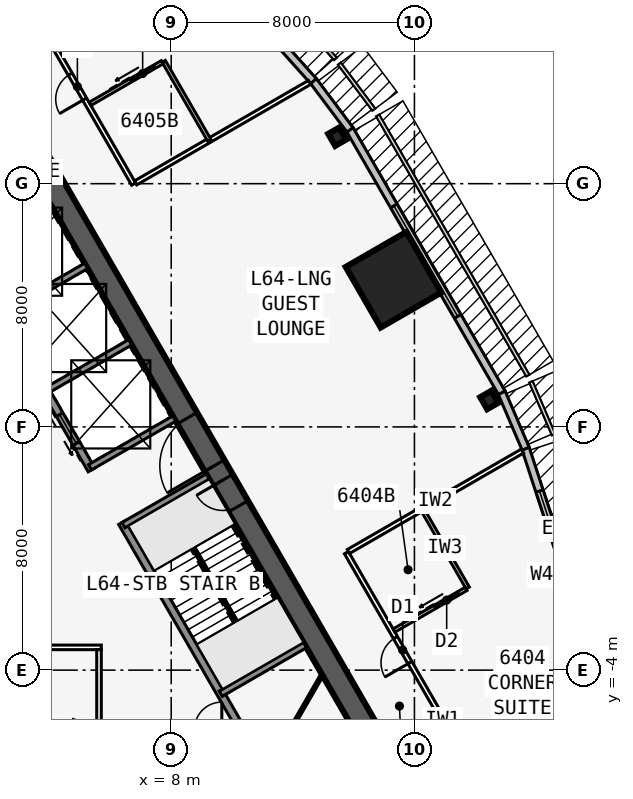
"""IFC4 building model, lengths in metres.
Left out: names, types, materials, properties, quantities, classifications, styles, units other than length and angle.
Written with IfcOpenShell. Run it as: python <this file> out.ifc"""

import sys

from ifc_helpers import new_model, si_unit, direction, frame, frame_2d, origin, origin_2d, place, context, subcontext, project, spatial, rectangle, i_section, extrude, element, fill, save


model = new_model("IFC4")
c1 = context("Model", 3, precision=1e-05, world=origin(), true_north=direction((0.0, 1.0)))
c2 = subcontext(c1, "Body", "Model", "MODEL_VIEW")
j1 = project(units=[si_unit("LENGTHUNIT", "METRE"), si_unit("PLANEANGLEUNIT", "RADIAN")], contexts=[c1])
p1 = place(None, origin())
s1 = spatial("IfcSite", under=j1, at=p1, CompositionType="ELEMENT")
p2 = place(p1, origin())
s2 = spatial("IfcBuilding", under=s1, at=p2, CompositionType="ELEMENT")
p3 = place(p2, frame((0.0, 0.0, 242.9)))
s3 = spatial("IfcBuildingStorey", under=s2, at=p3, CompositionType="ELEMENT", Elevation=242.9)
p4 = place(p3, frame((16.5, -9.526, 0.0), z_axis=(0.0, 0.0, 1.0), x_axis=(-0.499999749417, 0.866025548458, 0.0)))
e1 = element("IfcWall", 1, at=p4, inside=s3, PredefinedType="SHEAR", context=c2, shape_type="SweptSolid", body=[
    extrude(rectangle(XDim=33.0, YDim=0.75, at=frame_2d((16.5, 0.0))), origin(), (0.0, 0.0, 1.0), 3.6),
])
p5 = place(p4, frame((14.15, 0.0, 0.0)))
e2 = element("IfcOpeningElement", 2, at=p5, cuts=e1, PredefinedType="OPENING", context=c2, shape_type="SweptSolid", body=[
    extrude(rectangle(XDim=1.8, YDim=2.13, at=frame_2d((0.9, 1.065))), frame((0.0, 0.385, 0.0), z_axis=(0.0, -1.0, 0.0), x_axis=(1.0, 0.0, 0.0)), (0.0, 0.0, 1.0), 0.77),
])
p6 = place(p4, frame((12.6, 0.0, 0.0)))
e3 = element("IfcOpeningElement", 3, at=p6, cuts=e1, PredefinedType="OPENING", context=c2, shape_type="SweptSolid", body=[
    extrude(rectangle(XDim=1.0, YDim=2.13, at=frame_2d((0.5, 1.065))), frame((0.0, 0.385, 0.0), z_axis=(0.0, -1.0, 0.0), x_axis=(1.0, 0.0, 0.0)), (0.0, 0.0, 1.0), 0.77),
])
p7 = place(p3, frame((10.245, -5.843, 0.0), z_axis=(0.0, 0.0, 1.0), x_axis=(-0.499993009313, 0.866029439822, 0.0)))
e4 = element("IfcWall", 4, at=p7, inside=s3, PredefinedType="SOLIDWALL", context=c2, shape_type="SweptSolid", body=[
    extrude(rectangle(XDim=7.733, YDim=0.25, at=frame_2d((3.866, 0.0))), origin(), (0.0, 0.0, 1.0), 3.435),
])
p8 = place(p3, frame((5.379, 2.586, 0.0), z_axis=(0.0, 0.0, 1.0), x_axis=(-0.500001375892, 0.866024609411, 0.0)))
e5 = element("IfcWall", 5, at=p8, inside=s3, PredefinedType="SOLIDWALL", context=c2, shape_type="SweptSolid", body=[
    extrude(rectangle(XDim=10.633, YDim=0.25, at=frame_2d((5.316, 0.0))), origin(), (0.0, 0.0, 1.0), 3.435),
])
p9 = place(p8, frame((9.164, 0.0, 0.0)))
e6 = element("IfcOpeningElement", 6, at=p9, cuts=e5, PredefinedType="OPENING", context=c2, shape_type="SweptSolid", body=[
    extrude(rectangle(XDim=0.9, YDim=2.13, at=frame_2d((0.45, 1.065))), frame((0.0, 0.135, 0.0), z_axis=(0.0, -1.0, 0.0), x_axis=(1.0, 0.0, 0.0)), (0.0, 0.0, 1.0), 0.27),
])
p10 = place(p8, frame((1.0, 0.0, 0.0)))
e7 = element("IfcOpeningElement", 7, at=p10, cuts=e5, PredefinedType="OPENING", context=c2, shape_type="SweptSolid", body=[
    extrude(rectangle(XDim=1.1, YDim=2.13, at=frame_2d((0.55, 1.065))), frame((0.0, 0.135, 0.0), z_axis=(0.0, -1.0, 0.0), x_axis=(1.0, 0.0, 0.0)), (0.0, 0.0, 1.0), 0.27),
])
p11 = place(p8, frame((3.9, 0.0, 0.0)))
e8 = element("IfcOpeningElement", 8, at=p11, cuts=e5, PredefinedType="OPENING", context=c2, shape_type="SweptSolid", body=[
    extrude(rectangle(XDim=1.1, YDim=2.13, at=frame_2d((0.55, 1.065))), frame((0.0, 0.135, 0.0), z_axis=(0.0, -1.0, 0.0), x_axis=(1.0, 0.0, 0.0)), (0.0, 0.0, 1.0), 0.27),
])
p12 = place(p8, frame((6.8, 0.0, 0.0)))
e9 = element("IfcOpeningElement", 9, at=p12, cuts=e5, PredefinedType="OPENING", context=c2, shape_type="SweptSolid", body=[
    extrude(rectangle(XDim=1.1, YDim=2.13, at=frame_2d((0.55, 1.065))), frame((0.0, 0.135, 0.0), z_axis=(0.0, -1.0, 0.0), x_axis=(1.0, 0.0, 0.0)), (0.0, 0.0, 1.0), 0.27),
])
for number, where, z_axis, x_axis in (
    (10, (9.629, -4.775, 0.0), (0.0, 0.0, 1.0), (0.866, 0.5, 0.0)),
    (11, (6.429, 0.767, 0.0), (0.0, 0.0, 1.0), (0.866, 0.5, 0.0)),
):
    element("IfcWall", number, at=place(p3, frame(where, z_axis=z_axis, x_axis=x_axis)), inside=s3, PredefinedType="SOLIDWALL", context=c2, shape_type="SweptSolid", body=[
        extrude(rectangle(XDim=3.2, YDim=0.2, at=frame_2d((1.6, 0.0))), origin(), (0.0, 0.0, 1.0), 3.435),
    ])
p13 = place(p3, frame((5.329, 2.673, 0.0), z_axis=(0.0, 0.0, 1.0), x_axis=(0.866022944154, 0.50000426018, 0.0)))
e12 = element("IfcWall", 12, at=p13, inside=s3, PredefinedType="SOLIDWALL", context=c2, shape_type="SweptSolid", body=[
    extrude(rectangle(XDim=3.2, YDim=0.2, at=frame_2d((1.6, 0.0))), origin(), (0.0, 0.0, 1.0), 3.435),
])
for number, where, z_axis, x_axis in (
    (13, (3.879, 5.184, 0.0), (0.0, 0.0, 1.0), (0.866, 0.5, 0.0)),
    (14, (2.429, 7.696, 0.0), (0.0, 0.0, 1.0), (0.866, 0.5, 0.0)),
):
    element("IfcWall", number, at=place(p3, frame(where, z_axis=z_axis, x_axis=x_axis)), inside=s3, PredefinedType="SOLIDWALL", context=c2, shape_type="SweptSolid", body=[
        extrude(rectangle(XDim=3.2, YDim=0.2, at=frame_2d((1.6, 0.0))), origin(), (0.0, 0.0, 1.0), 3.435),
    ])
for number, where, z_axis, x_axis in (
    (15, (18.461, 4.885, 0.0), (0.0, 0.0, 1.0), (0.866, 0.5, 0.0)),
    (16, (13.461, 13.545, 0.0), (0.0, 0.0, 1.0), (0.866, 0.5, 0.0)),
):
    element("IfcColumn", number, at=place(p3, frame(where, z_axis=z_axis, x_axis=x_axis)), inside=s3, PredefinedType="COLUMN", context=c2, shape_type="SweptSolid", body=[
        extrude(i_section(OverallWidth=0.419, OverallDepth=0.455, WebThickness=0.042, FlangeThickness=0.068, at=origin_2d()), origin(), (0.0, 0.0, 1.0), 3.6),
    ])
p14 = place(p3, frame((15.312, 8.84, 0.0), z_axis=(0.0, 0.0, 1.0), x_axis=(0.866025403784, 0.5, 0.0)))
e17 = element("IfcColumn", 17, at=p14, inside=s3, PredefinedType="COLUMN", context=c2, shape_type="SweptSolid", body=[
    extrude(rectangle(XDim=2.3, YDim=2.3, at=origin_2d()), origin(), (0.0, 0.0, 1.0), 3.6),
])
p15 = place(p3, frame((21.881, -3.503, 0.0), z_axis=(0.0, 0.0, 1.0), x_axis=(-0.311328857048, 0.95030223759, 0.0)))
e18 = element("IfcWall", 18, at=p15, inside=s3, PredefinedType="STANDARD", context=c2, shape_type="SweptSolid", body=[
    extrude(rectangle(XDim=7.153, YDim=0.25, at=frame_2d((3.576, 0.0))), origin(), (0.0, 0.0, 1.0), 3.435),
])
p16 = place(p15, frame((1.476, 0.0, 0.45)))
e19 = element("IfcOpeningElement", 19, at=p16, cuts=e18, PredefinedType="OPENING", context=c2, shape_type="SweptSolid", body=[
    extrude(rectangle(XDim=4.2, YDim=2.6, at=frame_2d((2.1, 1.3))), frame((0.0, 0.135, 0.0), z_axis=(0.0, -1.0, 0.0), x_axis=(1.0, 0.0, 0.0)), (0.0, 0.0, 1.0), 0.27),
])
p17 = place(p3, frame((19.658, 3.284, 0.0), z_axis=(0.0, 0.0, 1.0), x_axis=(-0.393290226175, 0.91941437774, 0.0)))
e20 = element("IfcWall", 20, at=p17, inside=s3, PredefinedType="STANDARD", context=c2, shape_type="SweptSolid", body=[
    extrude(rectangle(XDim=2.014, YDim=0.25, at=frame_2d((1.007, 0.0))), origin(), (0.0, 0.0, 1.0), 3.435),
])
p18 = place(p3, frame((18.873, 5.123, 0.0), z_axis=(0.0, 0.0, 1.0), x_axis=(-0.499993662806, 0.866029062534, 0.0)))
e21 = element("IfcWall", 21, at=p18, inside=s3, PredefinedType="STANDARD", context=c2, shape_type="SweptSolid", body=[
    extrude(rectangle(XDim=10.0, YDim=0.25, at=frame_2d((5.0, 0.0))), origin(), (0.0, 0.0, 1.0), 3.435),
])
p19 = place(p18, frame((2.9, 0.0, 0.45)))
e22 = element("IfcOpeningElement", 22, at=p19, cuts=e21, PredefinedType="OPENING", context=c2, shape_type="SweptSolid", body=[
    extrude(rectangle(XDim=4.2, YDim=2.6, at=frame_2d((2.1, 1.3))), frame((0.0, 0.135, 0.0), z_axis=(0.0, -1.0, 0.0), x_axis=(1.0, 0.0, 0.0)), (0.0, 0.0, 1.0), 0.27),
])
p20 = place(p3, frame((13.881, 13.771, 0.0), z_axis=(0.0, 0.0, 1.0), x_axis=(-0.599650843534, 0.800261748335, 0.0)))
e23 = element("IfcWall", 23, at=p20, inside=s3, PredefinedType="STANDARD", context=c2, shape_type="SweptSolid", body=[
    extrude(rectangle(XDim=2.014, YDim=0.25, at=frame_2d((1.007, 0.0))), origin(), (0.0, 0.0, 1.0), 3.435),
])
p21 = place(p3, frame((12.68, 15.374, 0.0), z_axis=(0.0, 0.0, 1.0), x_axis=(-0.667303550892, 0.744785855778, 0.0)))
e24 = element("IfcWall", 24, at=p21, inside=s3, PredefinedType="STANDARD", context=c2, shape_type="SweptSolid", body=[
    extrude(rectangle(XDim=7.153, YDim=0.25, at=frame_2d((3.576, 0.0))), origin(), (0.0, 0.0, 1.0), 3.435),
])
p22 = place(p21, frame((1.476, 0.0, 0.45)))
e25 = element("IfcOpeningElement", 25, at=p22, cuts=e24, PredefinedType="OPENING", context=c2, shape_type="SweptSolid", body=[
    extrude(rectangle(XDim=4.2, YDim=2.6, at=frame_2d((2.1, 1.3))), frame((0.0, 0.135, 0.0), z_axis=(0.0, -1.0, 0.0), x_axis=(1.0, 0.0, 0.0)), (0.0, 0.0, 1.0), 0.27),
])
p23 = place(p3, frame((20.102, -11.115, 0.0), z_axis=(0.0, 0.0, 1.0), x_axis=(-0.500001960654, 0.866024271797, 0.0)))
e26 = element("IfcWall", 26, at=p23, inside=s3, PredefinedType="PARTITIONING", context=c2, shape_type="SweptSolid", body=[
    extrude(rectangle(XDim=12.677, YDim=0.15, at=frame_2d((6.339, 0.0))), origin(), (0.0, 0.0, 1.0), 3.435),
])
p24 = place(p23, frame((8.502, 0.0, 0.0)))
e27 = element("IfcOpeningElement", 27, at=p24, cuts=e26, PredefinedType="OPENING", context=c2, shape_type="SweptSolid", body=[
    extrude(rectangle(XDim=0.95, YDim=2.13, at=frame_2d((0.475, 1.065))), frame((0.0, 0.085, 0.0), z_axis=(0.0, -1.0, 0.0), x_axis=(1.0, 0.0, 0.0)), (0.0, 0.0, 1.0), 0.17),
])
p25 = place(p3, frame((6.763, 11.988, 0.0), z_axis=(0.0, 0.0, 1.0), x_axis=(-0.49999585592, 0.866027796357, 0.0)))
e28 = element("IfcWall", 28, at=p25, inside=s3, PredefinedType="PARTITIONING", context=c2, shape_type="SweptSolid", body=[
    extrude(rectangle(XDim=12.677, YDim=0.15, at=frame_2d((6.338, 0.0))), origin(), (0.0, 0.0, 1.0), 3.435),
])
p26 = place(p25, frame((3.225, 0.0, 0.0)))
e29 = element("IfcOpeningElement", 29, at=p26, cuts=e28, PredefinedType="OPENING", context=c2, shape_type="SweptSolid", body=[
    extrude(rectangle(XDim=0.95, YDim=2.13, at=frame_2d((0.475, 1.065))), frame((0.0, 0.085, 0.0), z_axis=(0.0, -1.0, 0.0), x_axis=(1.0, 0.0, 0.0)), (0.0, 0.0, 1.0), 0.17),
])
p27 = place(p3, frame((13.829, -0.099, 0.0), z_axis=(0.0, 0.0, 1.0), x_axis=(0.866022562216, 0.500004921708, 0.0)))
e30 = element("IfcWall", 30, at=p27, inside=s3, PredefinedType="PARTITIONING", context=c2, shape_type="SweptSolid", body=[
    extrude(rectangle(XDim=6.609, YDim=0.15, at=frame_2d((3.304, 0.0))), origin(), (0.0, 0.0, 1.0), 2.678),
])
p28 = place(p3, frame((6.829, 12.025, 0.0), z_axis=(0.0, 0.0, 1.0), x_axis=(0.866029323189, 0.499993211332, 0.0)))
e31 = element("IfcWall", 31, at=p28, inside=s3, PredefinedType="PARTITIONING", context=c2, shape_type="SweptSolid", body=[
    extrude(rectangle(XDim=6.608, YDim=0.15, at=frame_2d((3.304, 0.0))), origin(), (0.0, 0.0, 1.0), 2.678),
])
p29 = place(p3, frame((17.753, -1.297, 0.0), z_axis=(0.0, 0.0, 1.0), x_axis=(-0.499990139034, 0.866031096941, 0.0)))
e32 = element("IfcWall", 32, at=p29, inside=s3, PredefinedType="PLUMBINGWALL", context=c2, shape_type="SweptSolid", body=[
    extrude(rectangle(XDim=3.0, YDim=0.12, at=frame_2d((1.5, 0.0))), origin(), (0.0, 0.0, 1.0), 3.435),
])
p30 = place(p3, frame((15.329, -2.697, 0.0), z_axis=(0.0, 0.0, 1.0), x_axis=(0.866035715982, 0.499982138324, 0.0)))
e33 = element("IfcWall", 33, at=p30, inside=s3, PredefinedType="PLUMBINGWALL", context=c2, shape_type="SweptSolid", body=[
    extrude(rectangle(XDim=2.74, YDim=0.12, at=frame_2d((1.37, 0.0))), origin(), (0.0, 0.0, 1.0), 3.435),
])
p31 = place(p30, frame((1.55, 0.0, 0.0)))
e34 = element("IfcOpeningElement", 34, at=p31, cuts=e33, PredefinedType="OPENING", context=c2, shape_type="SweptSolid", body=[
    extrude(rectangle(XDim=0.9, YDim=2.13, at=frame_2d((0.45, 1.065))), frame((0.0, 0.07, 0.0), z_axis=(0.0, -1.0, 0.0), x_axis=(1.0, 0.0, 0.0)), (0.0, 0.0, 1.0), 0.14),
])
p32 = place(p3, frame((9.253, 13.425, 0.0), z_axis=(0.0, 0.0, 1.0), x_axis=(-0.499990139034, 0.866031096941, 0.0)))
e35 = element("IfcWall", 35, at=p32, inside=s3, PredefinedType="PLUMBINGWALL", context=c2, shape_type="SweptSolid", body=[
    extrude(rectangle(XDim=3.0, YDim=0.12, at=frame_2d((1.5, 0.0))), origin(), (0.0, 0.0, 1.0), 3.435),
])
p33 = place(p3, frame((5.329, 14.623, 0.0), z_axis=(0.0, 0.0, 1.0), x_axis=(0.865997131366, 0.500048966069, 0.0)))
e36 = element("IfcWall", 36, at=p33, inside=s3, PredefinedType="PLUMBINGWALL", context=c2, shape_type="SweptSolid", body=[
    extrude(rectangle(XDim=2.74, YDim=0.12, at=frame_2d((1.37, 0.0))), origin(), (0.0, 0.0, 1.0), 3.435),
])
p34 = place(p33, frame((1.55, 0.0, 0.0)))
e37 = element("IfcOpeningElement", 37, at=p34, cuts=e36, PredefinedType="OPENING", context=c2, shape_type="SweptSolid", body=[
    extrude(rectangle(XDim=0.9, YDim=2.13, at=frame_2d((0.45, 1.065))), frame((0.0, 0.07, 0.0), z_axis=(0.0, -1.0, 0.0), x_axis=(1.0, 0.0, 0.0)), (0.0, 0.0, 1.0), 0.14),
])
p35 = place(p3, frame((-2.65, -3.251, 0.0), z_axis=(0.0, 0.0, 1.0), x_axis=(1.0, 0.0, 0.0)))
e38 = element("IfcWall", 38, at=p35, inside=s3, PredefinedType="PARTITIONING", context=c2, shape_type="SweptSolid", body=[
    extrude(rectangle(XDim=8.35, YDim=0.15, at=frame_2d((4.175, 0.0))), origin(), (0.0, 0.0, 1.0), 3.435),
])
p36 = place(p3, frame((5.625, -5.826, 0.0), z_axis=(0.0, 0.0, 1.0), x_axis=(0.0, 1.0, 0.0)))
e39 = element("IfcWall", 39, at=p36, inside=s3, PredefinedType="PARTITIONING", context=c2, shape_type="SweptSolid", body=[
    extrude(rectangle(XDim=2.5, YDim=0.15, at=frame_2d((1.25, 0.0))), origin(), (0.0, 0.0, 1.0), 3.435),
])
p37 = place(p3, frame((12.964, -4.151, 0.0), z_axis=(0.0, 0.0, 1.0), x_axis=(-0.500027479704, -0.866009537788, 0.0)))
e40 = element("IfcWall", 40, at=p37, inside=s3, PredefinedType="PARTITIONING", context=c2, shape_type="SweptSolid", body=[
    extrude(rectangle(XDim=5.774, YDim=0.1, at=frame_2d((2.887, 0.0))), origin(), (0.0, 0.0, 1.0), 3.435),
])
p38 = place(p37, frame((2.437, 0.0, 0.0)))
e41 = element("IfcOpeningElement", 41, at=p38, cuts=e40, PredefinedType="OPENING", context=c2, shape_type="SweptSolid", body=[
    extrude(rectangle(XDim=0.9, YDim=2.13, at=frame_2d((0.45, 1.065))), frame((0.0, 0.06, 0.0), z_axis=(0.0, -1.0, 0.0), x_axis=(1.0, 0.0, 0.0)), (0.0, 0.0, 1.0), 0.12),
])
p39 = place(p3, frame((10.135, -2.401, 0.0), z_axis=(0.0, 0.0, 1.0), x_axis=(-0.499992232847, 0.866029888106, 0.0)))
e42 = element("IfcWall", 42, at=p39, inside=s3, PredefinedType="SOLIDWALL", context=c2, shape_type="SweptSolid", body=[
    extrude(rectangle(XDim=2.794, YDim=0.1, at=frame_2d((1.397, 0.0))), origin(), (0.0, 0.0, 1.0), 3.6),
])
p40 = place(p16, origin())
e43 = element("IfcWindow", 43, at=p40, inside=s3, PartitioningType="SINGLE_PANEL", PredefinedType="WINDOW", context=c2, shape_type="SweptSolid", body=[
    extrude(rectangle(XDim=4.2, YDim=2.6, at=frame_2d((2.1, 1.3))), frame((0.0, 0.03, 0.0), z_axis=(0.0, -1.0, 0.0), x_axis=(1.0, 0.0, 0.0)), (0.0, 0.0, 1.0), 0.06),
])
fill(e19, e43)
p41 = place(p19, origin())
e44 = element("IfcWindow", 44, at=p41, inside=s3, PartitioningType="SINGLE_PANEL", PredefinedType="WINDOW", context=c2, shape_type="SweptSolid", body=[
    extrude(rectangle(XDim=4.2, YDim=2.6, at=frame_2d((2.1, 1.3))), frame((0.0, 0.03, 0.0), z_axis=(0.0, -1.0, 0.0), x_axis=(1.0, 0.0, 0.0)), (0.0, 0.0, 1.0), 0.06),
])
fill(e22, e44)
p42 = place(p31, origin())
e45 = element("IfcDoor", 45, at=p42, inside=s3, OperationType="SLIDING_TO_LEFT", PredefinedType="DOOR", context=c2, shape_type="SweptSolid", body=[
    extrude(rectangle(XDim=0.9, YDim=2.13, at=frame_2d((0.45, 1.065))), frame((0.0, 0.025, 0.0), z_axis=(0.0, -1.0, 0.0), x_axis=(1.0, 0.0, 0.0)), (0.0, 0.0, 1.0), 0.05),
])
fill(e34, e45)
p43 = place(p24, origin())
e46 = element("IfcDoor", 46, at=p43, inside=s3, OperationType="SINGLE_SWING_LEFT", PredefinedType="DOOR", context=c2, shape_type="SweptSolid", body=[
    extrude(rectangle(XDim=0.95, YDim=2.13, at=frame_2d((0.475, 1.065))), frame((0.0, 0.025, 0.0), z_axis=(0.0, -1.0, 0.0), x_axis=(1.0, 0.0, 0.0)), (0.0, 0.0, 1.0), 0.05),
])
fill(e27, e46)
p44 = place(p34, origin())
e47 = element("IfcDoor", 47, at=p44, inside=s3, OperationType="SLIDING_TO_LEFT", PredefinedType="DOOR", context=c2, shape_type="SweptSolid", body=[
    extrude(rectangle(XDim=0.9, YDim=2.13, at=frame_2d((0.45, 1.065))), frame((0.0, 0.025, 0.0), z_axis=(0.0, -1.0, 0.0), x_axis=(1.0, 0.0, 0.0)), (0.0, 0.0, 1.0), 0.05),
])
fill(e37, e47)
p45 = place(p26, origin())
e48 = element("IfcDoor", 48, at=p45, inside=s3, OperationType="SINGLE_SWING_LEFT", PredefinedType="DOOR", context=c2, shape_type="SweptSolid", body=[
    extrude(rectangle(XDim=0.95, YDim=2.13, at=frame_2d((0.475, 1.065))), frame((0.0, 0.025, 0.0), z_axis=(0.0, -1.0, 0.0), x_axis=(1.0, 0.0, 0.0)), (0.0, 0.0, 1.0), 0.05),
])
fill(e29, e48)
p46 = place(p5, origin())
e49 = element("IfcDoor", 49, at=p46, inside=s3, OperationType="DOUBLE_DOOR_SINGLE_SWING", PredefinedType="DOOR", context=c2, shape_type="SweptSolid", body=[
    extrude(rectangle(XDim=1.8, YDim=2.13, at=frame_2d((0.9, 1.065))), frame((0.0, 0.025, 0.0), z_axis=(0.0, -1.0, 0.0), x_axis=(1.0, 0.0, 0.0)), (0.0, 0.0, 1.0), 0.05),
])
fill(e2, e49)
p47 = place(p6, origin())
e50 = element("IfcDoor", 50, at=p47, inside=s3, OperationType="SINGLE_SWING_RIGHT", PredefinedType="DOOR", context=c2, shape_type="SweptSolid", body=[
    extrude(rectangle(XDim=1.0, YDim=2.13, at=frame_2d((0.5, 1.065))), frame((0.0, 0.025, 0.0), z_axis=(0.0, -1.0, 0.0), x_axis=(1.0, 0.0, 0.0)), (0.0, 0.0, 1.0), 0.05),
])
fill(e3, e50)
p48 = place(p10, origin())
e51 = element("IfcDoor", 51, at=p48, inside=s3, OperationType="DOUBLE_DOOR_SLIDING", PredefinedType="USERDEFINED", context=c2, shape_type="SweptSolid", body=[
    extrude(rectangle(XDim=1.1, YDim=2.13, at=frame_2d((0.55, 1.065))), frame((0.0, 0.025, 0.0), z_axis=(0.0, -1.0, 0.0), x_axis=(1.0, 0.0, 0.0)), (0.0, 0.0, 1.0), 0.05),
])
fill(e7, e51)
save(model, sys.argv[1])
